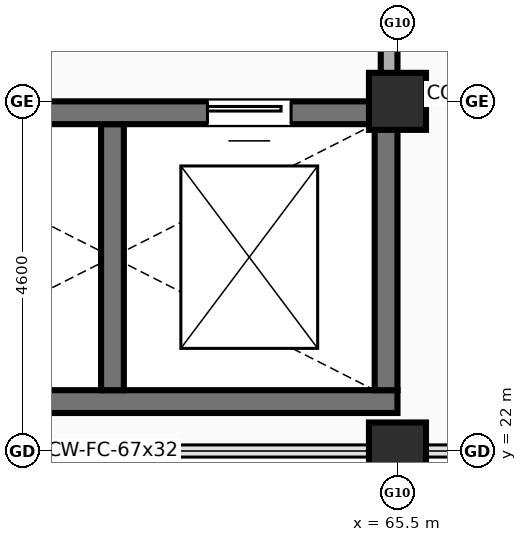
"""IFC4 building model, lengths in metres.
Left out: names, types, materials, properties, quantities, classifications, styles, units other than length and angle.
Written with IfcOpenShell. Run it as: python <this file> out.ifc"""

import sys

from ifc_helpers import new_model, si_unit, direction, frame, frame_2d, origin, origin_2d, place, context, subcontext, project, spatial, rectangle, extrude, element, fill, save


model = new_model("IFC4")
c1 = context("Model", 3, precision=1e-05, world=origin(), true_north=direction((0.0, 1.0)))
c2 = subcontext(c1, "Body", "Model", "MODEL_VIEW")
j1 = project(units=[si_unit("LENGTHUNIT", "METRE"), si_unit("PLANEANGLEUNIT", "RADIAN")], contexts=[c1])
p1 = place(None, origin())
s1 = spatial("IfcSite", under=j1, at=p1, CompositionType="ELEMENT")
p2 = place(p1, origin())
s2 = spatial("IfcBuilding", under=s1, at=p2, CompositionType="ELEMENT")
p3 = place(p2, frame((0.0, 0.0, 5.4)))
s3 = spatial("IfcBuildingStorey", under=s2, at=p3, CompositionType="ELEMENT", Elevation=5.4)
for number, where, z_axis, x_axis in (
    (1, (65.5, 22.0, 0.0), (0.0, 0.0, 1.0), (1.0, 0.0, 0.0)),
    (2, (65.5, 26.6, 0.0), (0.0, 0.0, 1.0), (1.0, 0.0, 0.0)),
):
    element("IfcColumn", number, at=place(p3, frame(where, z_axis=z_axis, x_axis=x_axis)), inside=s3, PredefinedType="COLUMN", context=c2, shape_type="SweptSolid", body=[
        extrude(rectangle(XDim=0.75, YDim=0.75, at=origin_2d()), origin(), (0.0, 0.0, 1.0), 4.4),
    ])
p4 = place(p3, frame((58.0, 22.65, 0.0), z_axis=(0.0, 0.0, 1.0), x_axis=(1.0, 0.0, 0.0)))
e3 = element("IfcWall", 3, at=p4, inside=s3, PredefinedType="SHEAR", context=c2, shape_type="SweptSolid", body=[
    extrude(rectangle(XDim=7.5, YDim=0.3, at=frame_2d((3.75, 0.0))), origin(), (0.0, 0.0, 1.0), 4.4),
])
for number, where, z_axis, x_axis in (
    (4, (65.35, 22.8, 0.0), (0.0, 0.0, 1.0), (0.0, 1.0, 0.0)),
    (5, (61.75, 22.8, 0.0), (0.0, 0.0, 1.0), (0.0, 1.0, 0.0)),
):
    element("IfcWall", number, at=place(p3, frame(where, z_axis=z_axis, x_axis=x_axis)), inside=s3, PredefinedType="SHEAR", context=c2, shape_type="SweptSolid", body=[
        extrude(rectangle(XDim=3.5, YDim=0.3, at=frame_2d((1.75, 0.0))), origin(), (0.0, 0.0, 1.0), 4.4),
    ])
p5 = place(p3, frame((58.0, 26.45, 0.0), z_axis=(0.0, 0.0, 1.0), x_axis=(1.0, 0.0, 0.0)))
e6 = element("IfcWall", 6, at=p5, inside=s3, PredefinedType="SHEAR", context=c2, shape_type="SweptSolid", body=[
    extrude(rectangle(XDim=7.5, YDim=0.3, at=frame_2d((3.75, 0.0))), origin(), (0.0, 0.0, 1.0), 4.4),
])
p6 = place(p5, frame((1.4, 0.0, 0.0)))
e7 = element("IfcOpeningElement", 7, at=p6, cuts=e6, PredefinedType="OPENING", context=c2, shape_type="SweptSolid", body=[
    extrude(rectangle(XDim=1.1, YDim=2.15, at=frame_2d((0.55, 1.075))), frame((0.0, 0.16, 0.0), z_axis=(0.0, -1.0, 0.0), x_axis=(1.0, 0.0, 0.0)), (0.0, 0.0, 1.0), 0.32),
])
p7 = place(p5, frame((5.0, 0.0, 0.0)))
e8 = element("IfcOpeningElement", 8, at=p7, cuts=e6, PredefinedType="OPENING", context=c2, shape_type="SweptSolid", body=[
    extrude(rectangle(XDim=1.1, YDim=2.15, at=frame_2d((0.55, 1.075))), frame((0.0, 0.16, 0.0), z_axis=(0.0, -1.0, 0.0), x_axis=(1.0, 0.0, 0.0)), (0.0, 0.0, 1.0), 0.32),
])
p8 = place(p3, frame((65.39, 26.75, 0.0), z_axis=(0.0, 0.0, 1.0), x_axis=(0.0, 1.0, 0.0)))
e9 = element("IfcWall", 9, at=p8, inside=s3, PredefinedType="SOLIDWALL", context=c2, shape_type="SweptSolid", body=[
    extrude(rectangle(XDim=3.83, YDim=0.22, at=frame_2d((1.915, 0.0))), origin(), (0.0, 0.0, 1.0), 3.3),
])
p9 = place(p7, origin())
e10 = element("IfcDoor", 10, at=p9, inside=s3, OperationType="SLIDING_TO_LEFT", PredefinedType="DOOR", context=c2, shape_type="SweptSolid", body=[
    extrude(rectangle(XDim=1.1, YDim=2.15, at=frame_2d((0.55, 1.075))), frame((0.0, 0.025, 0.0), z_axis=(0.0, -1.0, 0.0), x_axis=(1.0, 0.0, 0.0)), (0.0, 0.0, 1.0), 0.05),
])
fill(e8, e10)
save(model, sys.argv[1])
